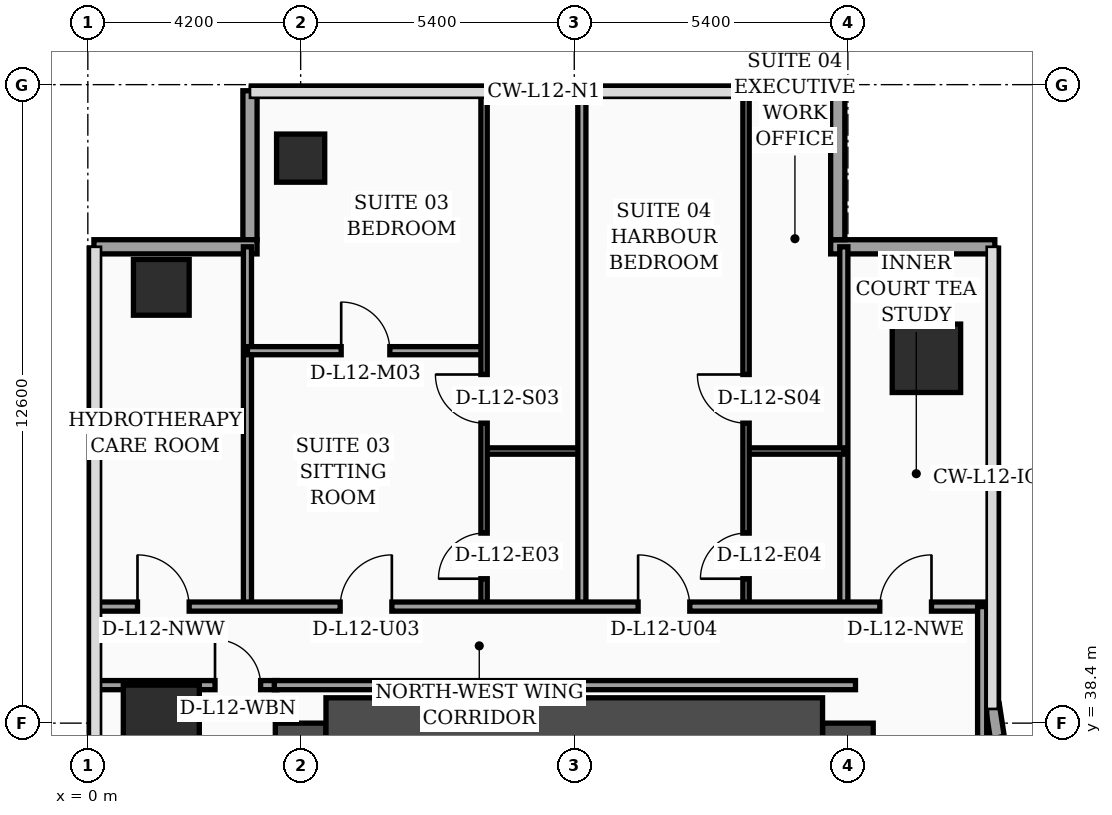
"""IFC4 building model, lengths in metres.
Left out: names, types, materials, properties, quantities, classifications, styles, units other than length and angle.
Written with IfcOpenShell. Run it as: python <this file> out.ifc"""

import sys

from ifc_helpers import new_model, si_unit, direction, frame, frame_2d, origin, origin_2d, place, context, subcontext, project, spatial, rectangle, hollow_rectangle, extrude, element, fill, save


model = new_model("IFC4")
c1 = context("Model", 3, precision=1e-05, world=origin(), true_north=direction((0.0, 1.0)))
c2 = subcontext(c1, "Body", "Model", "MODEL_VIEW")
j1 = project(units=[si_unit("LENGTHUNIT", "METRE"), si_unit("PLANEANGLEUNIT", "RADIAN")], contexts=[c1])
p1 = place(None, origin())
s1 = spatial("IfcSite", under=j1, at=p1, CompositionType="ELEMENT")
p2 = place(p1, origin())
s2 = spatial("IfcBuilding", under=s1, at=p2, CompositionType="ELEMENT")
p3 = place(p2, frame((0.0, 0.0, 54.6)))
s3 = spatial("IfcBuildingStorey", under=s2, at=p3, CompositionType="ELEMENT", Elevation=54.6)
p4 = place(p3, frame((4.2, 16.8, 0.0), z_axis=(0.0, 0.0, 1.0), x_axis=(0.0, 1.0, 0.0)))
e1 = element("IfcWall", 1, at=p4, inside=s3, PredefinedType="SHEAR", context=c2, shape_type="SweptSolid", body=[
    extrude(rectangle(XDim=21.6, YDim=1.0, at=frame_2d((10.8, 0.0))), origin(), (0.0, 0.0, 1.0), 3.56),
])
p5 = place(p3, frame((15.0, 16.8, 0.0), z_axis=(0.0, 0.0, 1.0), x_axis=(0.0, 1.0, 0.0)))
e2 = element("IfcWall", 2, at=p5, inside=s3, PredefinedType="SHEAR", context=c2, shape_type="SweptSolid", body=[
    extrude(rectangle(XDim=21.6, YDim=1.0, at=frame_2d((10.8, 0.0))), origin(), (0.0, 0.0, 1.0), 3.56),
])
p6 = place(p5, frame((8.65, 0.0, 0.0)))
e3 = element("IfcOpeningElement", 3, at=p6, cuts=e2, PredefinedType="OPENING", context=c2, shape_type="SweptSolid", body=[
    extrude(rectangle(XDim=1.1, YDim=2.2, at=frame_2d((0.55, 1.1))), frame((0.0, 0.51, 0.0), z_axis=(0.0, -1.0, 0.0), x_axis=(1.0, 0.0, 0.0)), (0.0, 0.0, 1.0), 1.02),
])
p7 = place(p5, frame((1.25, 0.0, 0.0)))
e4 = element("IfcOpeningElement", 4, at=p7, cuts=e2, PredefinedType="OPENING", context=c2, shape_type="SweptSolid", body=[
    extrude(rectangle(XDim=1.1, YDim=2.2, at=frame_2d((0.55, 1.1))), frame((0.0, 0.51, 0.0), z_axis=(0.0, -1.0, 0.0), x_axis=(1.0, 0.0, 0.0)), (0.0, 0.0, 1.0), 1.02),
])
p8 = place(p5, frame((3.8, 0.0, 0.0)))
e5 = element("IfcOpeningElement", 5, at=p8, cuts=e2, PredefinedType="OPENING", context=c2, shape_type="SweptSolid", body=[
    extrude(rectangle(XDim=1.1, YDim=2.2, at=frame_2d((0.55, 1.1))), frame((0.0, 0.51, 0.0), z_axis=(0.0, -1.0, 0.0), x_axis=(1.0, 0.0, 0.0)), (0.0, 0.0, 1.0), 1.02),
])
p9 = place(p5, frame((6.35, 0.0, 0.0)))
e6 = element("IfcOpeningElement", 6, at=p9, cuts=e2, PredefinedType="OPENING", context=c2, shape_type="SweptSolid", body=[
    extrude(rectangle(XDim=1.1, YDim=2.2, at=frame_2d((0.55, 1.1))), frame((0.0, 0.51, 0.0), z_axis=(0.0, -1.0, 0.0), x_axis=(1.0, 0.0, 0.0)), (0.0, 0.0, 1.0), 1.02),
])
p10 = place(p3, frame((4.7, 38.4, 0.0), z_axis=(0.0, 0.0, 1.0), x_axis=(1.0, 0.0, 0.0)))
e7 = element("IfcWall", 7, at=p10, inside=s3, PredefinedType="SHEAR", context=c2, shape_type="SweptSolid", body=[
    extrude(rectangle(XDim=9.8, YDim=1.0, at=frame_2d((4.9, 0.0))), origin(), (0.0, 0.0, 1.0), 3.56),
])
p11 = place(p3, frame((1.45, 38.4, 0.0), z_axis=(0.0, 0.0, 1.0), x_axis=(1.0, 0.0, 0.0)))
e8 = element("IfcColumn", 8, at=p11, inside=s3, PredefinedType="COLUMN", context=c2, shape_type="SweptSolid", body=[
    extrude(rectangle(XDim=1.5, YDim=1.5, at=origin_2d()), origin(), (0.0, 0.0, 1.0), 3.56),
])
p12 = place(p3, frame((1.45, 47.0, 0.0), z_axis=(0.0, 0.0, 1.0), x_axis=(1.0, 0.0, 0.0)))
e9 = element("IfcColumn", 9, at=p12, inside=s3, PredefinedType="COLUMN", context=c2, shape_type="SweptSolid", body=[
    extrude(hollow_rectangle(XDim=1.1, YDim=1.1, WallThickness=0.045, at=origin_2d()), origin(), (0.0, 0.0, 1.0), 3.56),
])
p13 = place(p3, frame((4.2, 49.55, 0.0), z_axis=(0.0, 0.0, 1.0), x_axis=(1.0, 0.0, 0.0)))
e10 = element("IfcColumn", 10, at=p13, inside=s3, PredefinedType="COLUMN", context=c2, shape_type="SweptSolid", body=[
    extrude(hollow_rectangle(XDim=0.95, YDim=0.95, WallThickness=0.04, at=origin_2d()), origin(), (0.0, 0.0, 1.0), 3.56),
])
p14 = place(p3, frame((16.55, 45.6, 0.0), z_axis=(0.0, 0.0, 1.0), x_axis=(1.0, 0.0, 0.0)))
e11 = element("IfcColumn", 11, at=p14, inside=s3, PredefinedType="COLUMN", context=c2, shape_type="SweptSolid", body=[
    extrude(rectangle(XDim=1.35, YDim=1.35, at=origin_2d()), origin(), (0.0, 0.0, 1.0), 3.56),
])
p15 = place(p3, frame((17.962, 38.03, 0.0), z_axis=(0.0, 0.0, 1.0), x_axis=(-0.15141125477, 0.988470855377, 0.0)))
e12 = element("IfcWall", 12, at=p15, inside=s3, PredefinedType="SOLIDWALL", context=c2, shape_type="SweptSolid", body=[
    extrude(rectangle(XDim=0.739, YDim=0.28, at=frame_2d((0.369, 0.0))), origin(), (0.0, 0.0, 1.0), 3.56),
])
p16 = place(p3, frame((17.9, 47.8, 0.0), z_axis=(0.0, 0.0, 1.0), x_axis=(-1.0, 0.0, 0.0)))
e13 = element("IfcWall", 13, at=p16, inside=s3, PredefinedType="SOLIDWALL", context=c2, shape_type="SweptSolid", body=[
    extrude(rectangle(XDim=3.24, YDim=0.28, at=frame_2d((1.62, 0.0))), origin(), (0.0, 0.0, 1.0), 3.56),
])
p17 = place(p3, frame((14.8, 47.94, 0.0), z_axis=(0.0, 0.0, 1.0), x_axis=(0.0, 1.0, 0.0)))
e14 = element("IfcWall", 14, at=p17, inside=s3, PredefinedType="SOLIDWALL", context=c2, shape_type="SweptSolid", body=[
    extrude(rectangle(XDim=2.94, YDim=0.28, at=frame_2d((1.47, 0.0))), origin(), (0.0, 0.0, 1.0), 3.56),
])
p18 = place(p3, frame((3.2, 50.88, 0.0), z_axis=(0.0, 0.0, 1.0), x_axis=(0.0, -1.0, 0.0)))
e15 = element("IfcWall", 15, at=p18, inside=s3, PredefinedType="SOLIDWALL", context=c2, shape_type="SweptSolid", body=[
    extrude(rectangle(XDim=2.94, YDim=0.28, at=frame_2d((1.47, 0.0))), origin(), (0.0, 0.0, 1.0), 3.04),
])
p19 = place(p3, frame((3.34, 47.8, 0.0), z_axis=(0.0, 0.0, 1.0), x_axis=(-1.0, 0.0, 0.0)))
e16 = element("IfcWall", 16, at=p19, inside=s3, PredefinedType="SOLIDWALL", context=c2, shape_type="SweptSolid", body=[
    extrude(rectangle(XDim=3.22, YDim=0.28, at=frame_2d((1.61, 0.0))), origin(), (0.0, 0.0, 1.0), 3.04),
])
p20 = place(p3, frame((0.08, 39.15, 0.0), z_axis=(0.0, 0.0, 1.0), x_axis=(1.0, 0.0, 0.0)))
e17 = element("IfcWall", 17, at=p20, inside=s3, PredefinedType="PARTITIONING", context=c2, shape_type="SweptSolid", body=[
    extrude(rectangle(XDim=3.65, YDim=0.18, at=frame_2d((1.825, 0.0))), origin(), (0.0, 0.0, 1.0), 2.84),
])
p21 = place(p20, frame((2.43, 0.0, 0.0)))
e18 = element("IfcOpeningElement", 18, at=p21, cuts=e17, PredefinedType="OPENING", context=c2, shape_type="SweptSolid", body=[
    extrude(rectangle(XDim=0.9, YDim=2.15, at=frame_2d((0.45, 1.075))), frame((0.0, 0.1, 0.0), z_axis=(0.0, -1.0, 0.0), x_axis=(1.0, 0.0, 0.0)), (0.0, 0.0, 1.0), 0.2),
])
p22 = place(p3, frame((3.15, 40.7, 0.0), z_axis=(0.0, 0.0, 1.0), x_axis=(0.0, 1.0, 0.0)))
e19 = element("IfcWall", 19, at=p22, inside=s3, PredefinedType="PARTITIONING", context=c2, shape_type="SweptSolid", body=[
    extrude(rectangle(XDim=7.1, YDim=0.16, at=frame_2d((3.55, 0.0))), origin(), (0.0, 0.0, 1.0), 3.14),
])
p23 = place(p3, frame((14.92, 40.7, 0.0), z_axis=(0.0, 0.0, 1.0), x_axis=(0.0, 1.0, 0.0)))
e20 = element("IfcWall", 20, at=p23, inside=s3, PredefinedType="PARTITIONING", context=c2, shape_type="SweptSolid", body=[
    extrude(rectangle(XDim=7.1, YDim=0.16, at=frame_2d((3.55, 0.0))), origin(), (0.0, 0.0, 1.0), 3.04),
])
p24 = place(p3, frame((7.82, 43.77, 0.0), z_axis=(0.0, 0.0, 1.0), x_axis=(1.0, 0.0, 0.0)))
e21 = element("IfcWall", 21, at=p24, inside=s3, PredefinedType="PARTITIONING", context=c2, shape_type="SweptSolid", body=[
    extrude(rectangle(XDim=1.93, YDim=0.125, at=frame_2d((0.965, 0.0))), origin(), (0.0, 0.0, 1.0), 3.56),
])
p25 = place(p3, frame((3.15, 45.75, 0.0), z_axis=(0.0, 0.0, 1.0), x_axis=(1.0, 0.0, 0.0)))
e22 = element("IfcWall", 22, at=p25, inside=s3, PredefinedType="PARTITIONING", context=c2, shape_type="SweptSolid", body=[
    extrude(rectangle(XDim=4.67, YDim=0.16, at=frame_2d((2.335, 0.0))), origin(), (0.0, 0.0, 1.0), 2.84),
])
p26 = place(p25, frame((1.85, 0.0, 0.0)))
e23 = element("IfcOpeningElement", 23, at=p26, cuts=e22, PredefinedType="OPENING", context=c2, shape_type="SweptSolid", body=[
    extrude(rectangle(XDim=0.96, YDim=2.2, at=frame_2d((0.48, 1.1))), frame((0.0, 0.09, 0.0), z_axis=(0.0, -1.0, 0.0), x_axis=(1.0, 0.0, 0.0)), (0.0, 0.0, 1.0), 0.18),
])
p27 = place(p3, frame((7.82, 40.7, 0.0), z_axis=(0.0, 0.0, 1.0), x_axis=(0.0, 1.0, 0.0)))
e24 = element("IfcWall", 24, at=p27, inside=s3, PredefinedType="PARTITIONING", context=c2, shape_type="SweptSolid", body=[
    extrude(rectangle(XDim=10.24, YDim=0.125, at=frame_2d((5.12, 0.0))), origin(), (0.0, 0.0, 1.0), 3.04),
])
p28 = place(p27, frame((0.55, 0.0, 0.0)))
e25 = element("IfcOpeningElement", 25, at=p28, cuts=e24, PredefinedType="OPENING", context=c2, shape_type="SweptSolid", body=[
    extrude(rectangle(XDim=0.9, YDim=2.15, at=frame_2d((0.45, 1.075))), frame((0.0, 0.073, 0.0), z_axis=(0.0, -1.0, 0.0), x_axis=(1.0, 0.0, 0.0)), (0.0, 0.0, 1.0), 0.145),
])
p29 = place(p27, frame((3.62, 0.0, 0.0)))
e26 = element("IfcOpeningElement", 26, at=p29, cuts=e24, PredefinedType="OPENING", context=c2, shape_type="SweptSolid", body=[
    extrude(rectangle(XDim=0.96, YDim=2.2, at=frame_2d((0.48, 1.1))), frame((0.0, 0.073, 0.0), z_axis=(0.0, -1.0, 0.0), x_axis=(1.0, 0.0, 0.0)), (0.0, 0.0, 1.0), 0.145),
])
p30 = place(p3, frame((12.99, 43.77, 0.0), z_axis=(0.0, 0.0, 1.0), x_axis=(1.0, 0.0, 0.0)))
e27 = element("IfcWall", 27, at=p30, inside=s3, PredefinedType="PARTITIONING", context=c2, shape_type="SweptSolid", body=[
    extrude(rectangle(XDim=1.93, YDim=0.125, at=frame_2d((0.965, 0.0))), origin(), (0.0, 0.0, 1.0), 3.56),
])
p31 = place(p3, frame((12.99, 40.7, 0.0), z_axis=(0.0, 0.0, 1.0), x_axis=(0.0, 1.0, 0.0)))
e28 = element("IfcWall", 28, at=p31, inside=s3, PredefinedType="PARTITIONING", context=c2, shape_type="SweptSolid", body=[
    extrude(rectangle(XDim=10.24, YDim=0.125, at=frame_2d((5.12, 0.0))), origin(), (0.0, 0.0, 1.0), 3.04),
])
p32 = place(p31, frame((0.55, 0.0, 0.0)))
e29 = element("IfcOpeningElement", 29, at=p32, cuts=e28, PredefinedType="OPENING", context=c2, shape_type="SweptSolid", body=[
    extrude(rectangle(XDim=0.9, YDim=2.15, at=frame_2d((0.45, 1.075))), frame((0.0, 0.073, 0.0), z_axis=(0.0, -1.0, 0.0), x_axis=(1.0, 0.0, 0.0)), (0.0, 0.0, 1.0), 0.145),
])
p33 = place(p31, frame((3.62, 0.0, 0.0)))
e30 = element("IfcOpeningElement", 30, at=p33, cuts=e28, PredefinedType="OPENING", context=c2, shape_type="SweptSolid", body=[
    extrude(rectangle(XDim=0.96, YDim=2.2, at=frame_2d((0.48, 1.1))), frame((0.0, 0.073, 0.0), z_axis=(0.0, -1.0, 0.0), x_axis=(1.0, 0.0, 0.0)), (0.0, 0.0, 1.0), 0.145),
])
p34 = place(p3, frame((9.75, 40.7, 0.0), z_axis=(0.0, 0.0, 1.0), x_axis=(0.0, 1.0, 0.0)))
e31 = element("IfcWall", 31, at=p34, inside=s3, PredefinedType="PARTITIONING", context=c2, shape_type="SweptSolid", body=[
    extrude(rectangle(XDim=10.24, YDim=0.16, at=frame_2d((5.12, 0.0))), origin(), (0.0, 0.0, 1.0), 3.04),
])
p35 = place(p3, frame((0.08, 40.7, 0.0), z_axis=(0.0, 0.0, 1.0), x_axis=(1.0, 0.0, 0.0)))
e32 = element("IfcWall", 32, at=p35, inside=s3, PredefinedType="PARTITIONING", context=c2, shape_type="SweptSolid", body=[
    extrude(rectangle(XDim=17.77, YDim=0.18, at=frame_2d((8.885, 0.0))), origin(), (0.0, 0.0, 1.0), 2.84),
])
p36 = place(p35, frame((0.9, 0.0, 0.0)))
e33 = element("IfcOpeningElement", 33, at=p36, cuts=e32, PredefinedType="OPENING", context=c2, shape_type="SweptSolid", body=[
    extrude(rectangle(XDim=1.02, YDim=2.2, at=frame_2d((0.51, 1.1))), frame((0.0, 0.1, 0.0), z_axis=(0.0, -1.0, 0.0), x_axis=(1.0, 0.0, 0.0)), (0.0, 0.0, 1.0), 0.2),
])
p37 = place(p35, frame((4.9, 0.0, 0.0)))
e34 = element("IfcOpeningElement", 34, at=p37, cuts=e32, PredefinedType="OPENING", context=c2, shape_type="SweptSolid", body=[
    extrude(rectangle(XDim=1.02, YDim=2.2, at=frame_2d((0.51, 1.1))), frame((0.0, 0.1, 0.0), z_axis=(0.0, -1.0, 0.0), x_axis=(1.0, 0.0, 0.0)), (0.0, 0.0, 1.0), 0.2),
])
p38 = place(p35, frame((10.78, 0.0, 0.0)))
e35 = element("IfcOpeningElement", 35, at=p38, cuts=e32, PredefinedType="OPENING", context=c2, shape_type="SweptSolid", body=[
    extrude(rectangle(XDim=1.02, YDim=2.2, at=frame_2d((0.51, 1.1))), frame((0.0, 0.1, 0.0), z_axis=(0.0, -1.0, 0.0), x_axis=(1.0, 0.0, 0.0)), (0.0, 0.0, 1.0), 0.2),
])
p39 = place(p35, frame((15.55, 0.0, 0.0)))
e36 = element("IfcOpeningElement", 36, at=p39, cuts=e32, PredefinedType="OPENING", context=c2, shape_type="SweptSolid", body=[
    extrude(rectangle(XDim=1.02, YDim=2.2, at=frame_2d((0.51, 1.1))), frame((0.0, 0.1, 0.0), z_axis=(0.0, -1.0, 0.0), x_axis=(1.0, 0.0, 0.0)), (0.0, 0.0, 1.0), 0.2),
])
p40 = place(p3, frame((17.65, 24.3, 0.0), z_axis=(0.0, 0.0, 1.0), x_axis=(0.0, 1.0, 0.0)))
e37 = element("IfcWall", 37, at=p40, inside=s3, PredefinedType="PARTITIONING", context=c2, shape_type="SweptSolid", body=[
    extrude(rectangle(XDim=16.4, YDim=0.18, at=frame_2d((8.2, 0.0))), origin(), (0.0, 0.0, 1.0), 2.84),
])
p41 = place(p3, frame((3.68, 39.15, 0.0), z_axis=(0.0, 0.0, 1.0), x_axis=(1.0, 0.0, 0.0)))
e38 = element("IfcWall", 38, at=p41, inside=s3, PredefinedType="PARTITIONING", context=c2, shape_type="SweptSolid", body=[
    extrude(rectangle(XDim=11.47, YDim=0.18, at=frame_2d((5.735, 0.0))), origin(), (0.0, 0.0, 1.0), 2.84),
])
p42 = place(p21, origin())
e39 = element("IfcDoor", 39, at=p42, inside=s3, OperationType="SINGLE_SWING_LEFT", PredefinedType="DOOR", context=c2, shape_type="SweptSolid", body=[
    extrude(rectangle(XDim=0.9, YDim=2.15, at=frame_2d((0.45, 1.075))), frame((0.0, 0.025, 0.0), z_axis=(0.0, -1.0, 0.0), x_axis=(1.0, 0.0, 0.0)), (0.0, 0.0, 1.0), 0.05),
])
fill(e18, e39)
p43 = place(p26, origin())
e40 = element("IfcDoor", 40, at=p43, inside=s3, OperationType="SINGLE_SWING_LEFT", PredefinedType="DOOR", context=c2, shape_type="SweptSolid", body=[
    extrude(rectangle(XDim=0.96, YDim=2.2, at=frame_2d((0.48, 1.1))), frame((0.0, 0.025, 0.0), z_axis=(0.0, -1.0, 0.0), x_axis=(1.0, 0.0, 0.0)), (0.0, 0.0, 1.0), 0.05),
])
fill(e23, e40)
p44 = place(p28, origin())
e41 = element("IfcDoor", 41, at=p44, inside=s3, OperationType="SINGLE_SWING_LEFT", PredefinedType="DOOR", context=c2, shape_type="SweptSolid", body=[
    extrude(rectangle(XDim=0.9, YDim=2.15, at=frame_2d((0.45, 1.075))), frame((0.0, 0.025, 0.0), z_axis=(0.0, -1.0, 0.0), x_axis=(1.0, 0.0, 0.0)), (0.0, 0.0, 1.0), 0.05),
])
fill(e25, e41)
p45 = place(p29, origin())
e42 = element("IfcDoor", 42, at=p45, inside=s3, OperationType="SINGLE_SWING_RIGHT", PredefinedType="DOOR", context=c2, shape_type="SweptSolid", body=[
    extrude(rectangle(XDim=0.96, YDim=2.2, at=frame_2d((0.48, 1.1))), frame((0.0, 0.025, 0.0), z_axis=(0.0, -1.0, 0.0), x_axis=(1.0, 0.0, 0.0)), (0.0, 0.0, 1.0), 0.05),
])
fill(e26, e42)
p46 = place(p32, origin())
e43 = element("IfcDoor", 43, at=p46, inside=s3, OperationType="SINGLE_SWING_LEFT", PredefinedType="DOOR", context=c2, shape_type="SweptSolid", body=[
    extrude(rectangle(XDim=0.9, YDim=2.15, at=frame_2d((0.45, 1.075))), frame((0.0, 0.025, 0.0), z_axis=(0.0, -1.0, 0.0), x_axis=(1.0, 0.0, 0.0)), (0.0, 0.0, 1.0), 0.05),
])
fill(e29, e43)
p47 = place(p33, origin())
e44 = element("IfcDoor", 44, at=p47, inside=s3, OperationType="SINGLE_SWING_RIGHT", PredefinedType="DOOR", context=c2, shape_type="SweptSolid", body=[
    extrude(rectangle(XDim=0.96, YDim=2.2, at=frame_2d((0.48, 1.1))), frame((0.0, 0.025, 0.0), z_axis=(0.0, -1.0, 0.0), x_axis=(1.0, 0.0, 0.0)), (0.0, 0.0, 1.0), 0.05),
])
fill(e30, e44)
p48 = place(p36, origin())
e45 = element("IfcDoor", 45, at=p48, inside=s3, OperationType="SINGLE_SWING_LEFT", PredefinedType="DOOR", context=c2, shape_type="SweptSolid", body=[
    extrude(rectangle(XDim=1.02, YDim=2.2, at=frame_2d((0.51, 1.1))), frame((0.0, 0.025, 0.0), z_axis=(0.0, -1.0, 0.0), x_axis=(1.0, 0.0, 0.0)), (0.0, 0.0, 1.0), 0.05),
])
fill(e33, e45)
p49 = place(p37, origin())
e46 = element("IfcDoor", 46, at=p49, inside=s3, OperationType="SINGLE_SWING_RIGHT", PredefinedType="DOOR", context=c2, shape_type="SweptSolid", body=[
    extrude(rectangle(XDim=1.02, YDim=2.2, at=frame_2d((0.51, 1.1))), frame((0.0, 0.025, 0.0), z_axis=(0.0, -1.0, 0.0), x_axis=(1.0, 0.0, 0.0)), (0.0, 0.0, 1.0), 0.05),
])
fill(e34, e46)
p50 = place(p38, origin())
e47 = element("IfcDoor", 47, at=p50, inside=s3, OperationType="SINGLE_SWING_LEFT", PredefinedType="DOOR", context=c2, shape_type="SweptSolid", body=[
    extrude(rectangle(XDim=1.02, YDim=2.2, at=frame_2d((0.51, 1.1))), frame((0.0, 0.025, 0.0), z_axis=(0.0, -1.0, 0.0), x_axis=(1.0, 0.0, 0.0)), (0.0, 0.0, 1.0), 0.05),
])
fill(e35, e47)
p51 = place(p39, origin())
e48 = element("IfcDoor", 48, at=p51, inside=s3, OperationType="SINGLE_SWING_RIGHT", PredefinedType="DOOR", context=c2, shape_type="SweptSolid", body=[
    extrude(rectangle(XDim=1.02, YDim=2.2, at=frame_2d((0.51, 1.1))), frame((0.0, 0.025, 0.0), z_axis=(0.0, -1.0, 0.0), x_axis=(1.0, 0.0, 0.0)), (0.0, 0.0, 1.0), 0.05),
])
fill(e36, e48)
save(model, sys.argv[1])
